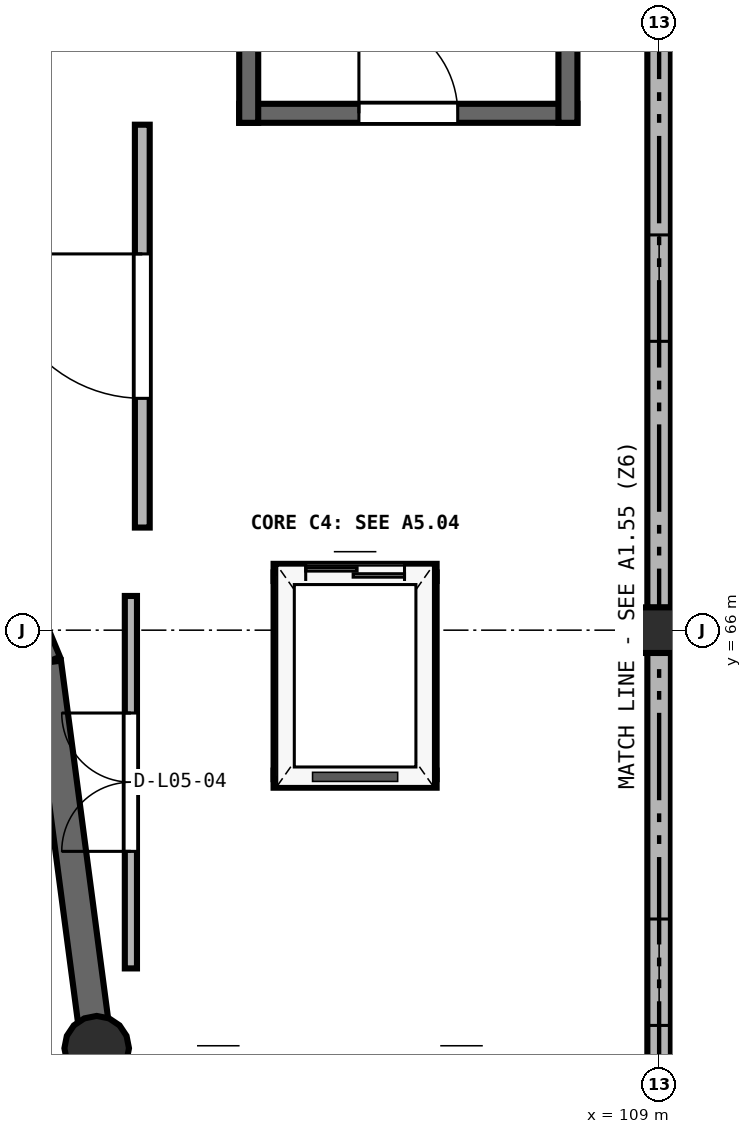
"""IFC4 building model, lengths in metres.
Left out: names, types, materials, properties, quantities, classifications, styles, units other than length and angle.
Written with IfcOpenShell. Run it as: python <this file> out.ifc"""

import sys

from ifc_helpers import new_model, si_unit, direction, frame, frame_2d, origin, origin_2d, place, context, subcontext, project, spatial, rectangle, circle, extrude, element, fill, save


model = new_model("IFC4")
c1 = context("Model", 3, precision=1e-05, world=origin(), true_north=direction((0.0, 1.0)))
c2 = subcontext(c1, "Body", "Model", "MODEL_VIEW")
j1 = project(units=[si_unit("LENGTHUNIT", "METRE"), si_unit("PLANEANGLEUNIT", "RADIAN")], contexts=[c1])
p1 = place(None, origin())
s1 = spatial("IfcSite", under=j1, at=p1, CompositionType="ELEMENT")
p2 = place(p1, origin())
s2 = spatial("IfcBuilding", under=s1, at=p2, CompositionType="ELEMENT")
p3 = place(p2, frame((0.0, 0.0, 23.7)))
s3 = spatial("IfcBuildingStorey", under=s2, at=p3, CompositionType="ELEMENT", Elevation=23.7)
p4 = place(p3, frame((109.0, 66.0, 0.0), z_axis=(0.0, 0.0, 1.0), x_axis=(1.0, 0.0, 0.0)))
e1 = element("IfcColumn", 1, at=p4, inside=s3, PredefinedType="COLUMN", context=c2, shape_type="SweptSolid", body=[
    extrude(rectangle(XDim=0.6, YDim=0.6, at=origin_2d()), origin(), (0.0, 0.0, 1.0), 4.28),
])
p5 = place(p3, frame((101.6, 60.5, 0.0), z_axis=(0.0, 0.0, 1.0), x_axis=(1.0, 0.0, 0.0)))
e2 = element("IfcColumn", 2, at=p5, inside=s3, PredefinedType="COLUMN", context=c2, shape_type="SweptSolid", body=[
    extrude(circle(Radius=0.425, at=origin_2d()), origin(), (0.0, 0.0, 1.0), 2.9),
])
p6 = place(p3, frame((101.6, 60.5, 0.0), z_axis=(0.0, 0.0, 1.0), x_axis=(-0.130591512704, 0.99143625958, 0.0)))
e3 = element("IfcWall", 3, at=p6, inside=s3, PredefinedType="SHEAR", context=c2, shape_type="SweptSolid", body=[
    extrude(rectangle(XDim=5.117, YDim=0.4, at=frame_2d((2.558, 0.0))), origin(), (0.0, 0.0, 1.0), 2.9),
])
p7 = place(p3, frame((100.932, 65.573, 0.0), z_axis=(0.0, 0.0, 1.0), x_axis=(-0.382642581018, 0.923896452635, 0.0)))
e4 = element("IfcWall", 4, at=p7, inside=s3, PredefinedType="SHEAR", context=c2, shape_type="SweptSolid", body=[
    extrude(rectangle(XDim=5.116, YDim=0.4, at=frame_2d((2.558, 0.0))), origin(), (0.0, 0.0, 1.0), 2.9),
])
p8 = place(p3, frame((100.932, 55.427, 0.0), z_axis=(0.0, 0.0, 1.0), x_axis=(0.130591512704, 0.99143625958, 0.0)))
e5 = element("IfcWall", 5, at=p8, inside=s3, PredefinedType="SHEAR", context=c2, shape_type="SweptSolid", body=[
    extrude(rectangle(XDim=5.117, YDim=0.4, at=frame_2d((2.558, 0.0))), origin(), (0.0, 0.0, 1.0), 2.9),
])
p9 = place(p3, frame((109.0, 57.296, 0.0), z_axis=(0.0, 0.0, 1.0), x_axis=(0.0, 1.0, 0.0)))
e6 = element("IfcWall", 6, at=p9, inside=s3, PredefinedType="SOLIDWALL", context=c2, shape_type="SweptSolid", body=[
    extrude(rectangle(XDim=8.408, YDim=0.31, at=frame_2d((4.204, 0.0))), origin(), (0.0, 0.0, 1.0), 3.722),
])
p10 = place(p9, frame((3.504, 0.0, 0.85)))
e7 = element("IfcOpeningElement", 7, at=p10, cuts=e6, PredefinedType="OPENING", context=c2, shape_type="SweptSolid", body=[
    extrude(rectangle(XDim=1.4, YDim=1.65, at=frame_2d((0.7, 0.825))), frame((0.0, 0.165, 0.0), z_axis=(0.0, -1.0, 0.0), x_axis=(1.0, 0.0, 0.0)), (0.0, 0.0, 1.0), 0.33),
])
p11 = place(p3, frame((109.0, 66.296, 0.0), z_axis=(0.0, 0.0, 1.0), x_axis=(0.0, 1.0, 0.0)))
e8 = element("IfcWall", 8, at=p11, inside=s3, PredefinedType="SOLIDWALL", context=c2, shape_type="SweptSolid", body=[
    extrude(rectangle(XDim=8.408, YDim=0.31, at=frame_2d((4.204, 0.0))), origin(), (0.0, 0.0, 1.0), 3.793),
])
p12 = place(p11, frame((3.504, 0.0, 0.85)))
e9 = element("IfcOpeningElement", 9, at=p12, cuts=e8, PredefinedType="OPENING", context=c2, shape_type="SweptSolid", body=[
    extrude(rectangle(XDim=1.4, YDim=1.65, at=frame_2d((0.7, 0.825))), frame((0.0, 0.165, 0.0), z_axis=(0.0, -1.0, 0.0), x_axis=(1.0, 0.0, 0.0)), (0.0, 0.0, 1.0), 0.33),
])
p13 = place(p3, frame((103.475, 72.8, 0.0), z_axis=(0.0, 0.0, 1.0), x_axis=(1.0, 0.0, 0.0)))
e10 = element("IfcWall", 10, at=p13, inside=s3, PredefinedType="SHEAR", context=c2, shape_type="SweptSolid", body=[
    extrude(rectangle(XDim=4.45, YDim=0.25, at=frame_2d((2.225, 0.0))), origin(), (0.0, 0.0, 1.0), 4.28),
])
p14 = place(p13, frame((1.575, 0.0, 0.0)))
e11 = element("IfcOpeningElement", 11, at=p14, cuts=e10, PredefinedType="OPENING", context=c2, shape_type="SweptSolid", body=[
    extrude(rectangle(XDim=1.3, YDim=2.18, at=frame_2d((0.65, 1.09))), frame((0.0, 0.135, 0.0), z_axis=(0.0, -1.0, 0.0), x_axis=(1.0, 0.0, 0.0)), (0.0, 0.0, 1.0), 0.27),
])
for number, where, z_axis, x_axis in (
    (12, (103.6, 72.675, 0.0), (0.0, 0.0, 1.0), (0.0, 1.0, 0.0)),
    (13, (107.8, 72.675, 0.0), (0.0, 0.0, 1.0), (0.0, 1.0, 0.0)),
):
    element("IfcWall", number, at=place(p3, frame(where, z_axis=z_axis, x_axis=x_axis)), inside=s3, PredefinedType="SHEAR", context=c2, shape_type="SweptSolid", body=[
        extrude(rectangle(XDim=11.09, YDim=0.25, at=frame_2d((5.545, 0.0))), origin(), (0.0, 0.0, 1.0), 4.28),
    ])
p15 = place(p3, frame((102.2, 67.35, 0.0), z_axis=(0.0, 0.0, 1.0), x_axis=(0.0, 1.0, 0.0)))
e14 = element("IfcWall", 14, at=p15, inside=s3, PredefinedType="PARTITIONING", context=c2, shape_type="SweptSolid", body=[
    extrude(rectangle(XDim=5.3, YDim=0.195, at=frame_2d((2.65, 0.0))), origin(), (0.0, 0.0, 1.0), 4.23),
])
p16 = place(p15, frame((1.7, 0.0, 0.0)))
e15 = element("IfcOpeningElement", 15, at=p16, cuts=e14, PredefinedType="OPENING", context=c2, shape_type="SweptSolid", body=[
    extrude(rectangle(XDim=1.9, YDim=2.3, at=frame_2d((0.95, 1.15))), frame((0.0, 0.107, 0.0), z_axis=(0.0, -1.0, 0.0), x_axis=(1.0, 0.0, 0.0)), (0.0, 0.0, 1.0), 0.215),
])
p17 = place(p3, frame((103.927, 66.76, 0.0), z_axis=(0.0, 0.0, 1.0), x_axis=(1.0, 0.0, 0.0)))
e16 = element("IfcWall", 16, at=p17, inside=s3, PredefinedType="SOLIDWALL", context=c2, shape_type="SweptSolid", body=[
    extrude(rectangle(XDim=2.145, YDim=0.225, at=frame_2d((1.073, 0.0))), origin(), (0.0, 0.0, 1.0), 4.23),
])
p18 = place(p17, frame((0.423, 0.0, 0.0)))
e17 = element("IfcOpeningElement", 17, at=p18, cuts=e16, PredefinedType="OPENING", context=c2, shape_type="SweptSolid", body=[
    extrude(rectangle(XDim=1.3, YDim=2.25, at=frame_2d((0.65, 1.125))), frame((0.0, 0.123, 0.0), z_axis=(0.0, -1.0, 0.0), x_axis=(1.0, 0.0, 0.0)), (0.0, 0.0, 1.0), 0.245),
])
p19 = place(p3, frame((103.927, 64.04, 0.0), z_axis=(0.0, 0.0, 1.0), x_axis=(1.0, 0.0, 0.0)))
e18 = element("IfcWall", 18, at=p19, inside=s3, PredefinedType="SOLIDWALL", context=c2, shape_type="SweptSolid", body=[
    extrude(rectangle(XDim=2.145, YDim=0.225, at=frame_2d((1.073, 0.0))), origin(), (0.0, 0.0, 1.0), 4.23),
])
for number, where, z_axis, x_axis in (
    (19, (104.04, 64.04, 0.0), (0.0, 0.0, 1.0), (0.0, 1.0, 0.0)),
    (20, (105.96, 64.04, 0.0), (0.0, 0.0, 1.0), (0.0, 1.0, 0.0)),
):
    element("IfcWall", number, at=place(p3, frame(where, z_axis=z_axis, x_axis=x_axis)), inside=s3, PredefinedType="SOLIDWALL", context=c2, shape_type="SweptSolid", body=[
        extrude(rectangle(XDim=2.72, YDim=0.225, at=frame_2d((1.36, 0.0))), origin(), (0.0, 0.0, 1.0), 4.23),
    ])
p20 = place(p3, frame((102.05, 61.55, 0.0), z_axis=(0.0, 0.0, 1.0), x_axis=(0.0, 1.0, 0.0)))
e21 = element("IfcWall", 21, at=p20, inside=s3, PredefinedType="PARTITIONING", context=c2, shape_type="SweptSolid", body=[
    extrude(rectangle(XDim=4.9, YDim=0.16, at=frame_2d((2.45, 0.0))), origin(), (0.0, 0.0, 1.0), 2.87),
])
p21 = place(p20, frame((1.54, 0.0, 0.0)))
e22 = element("IfcOpeningElement", 22, at=p21, cuts=e21, PredefinedType="OPENING", context=c2, shape_type="SweptSolid", body=[
    extrude(rectangle(XDim=1.82, YDim=2.35, at=frame_2d((0.91, 1.175))), frame((0.0, 0.09, 0.0), z_axis=(0.0, -1.0, 0.0), x_axis=(1.0, 0.0, 0.0)), (0.0, 0.0, 1.0), 0.18),
])
p22 = place(p10, origin())
e23 = element("IfcWindow", 23, at=p22, inside=s3, PartitioningType="SINGLE_PANEL", PredefinedType="WINDOW", context=c2, shape_type="SweptSolid", body=[
    extrude(rectangle(XDim=1.4, YDim=1.65, at=frame_2d((0.7, 0.825))), frame((0.0, 0.03, 0.0), z_axis=(0.0, -1.0, 0.0), x_axis=(1.0, 0.0, 0.0)), (0.0, 0.0, 1.0), 0.06),
])
fill(e7, e23)
p23 = place(p12, origin())
e24 = element("IfcWindow", 24, at=p23, inside=s3, PartitioningType="SINGLE_PANEL", PredefinedType="WINDOW", context=c2, shape_type="SweptSolid", body=[
    extrude(rectangle(XDim=1.4, YDim=1.65, at=frame_2d((0.7, 0.825))), frame((0.0, 0.03, 0.0), z_axis=(0.0, -1.0, 0.0), x_axis=(1.0, 0.0, 0.0)), (0.0, 0.0, 1.0), 0.06),
])
fill(e9, e24)
p24 = place(p14, origin())
e25 = element("IfcDoor", 25, at=p24, inside=s3, OperationType="SINGLE_SWING_LEFT", PredefinedType="DOOR", context=c2, shape_type="SweptSolid", body=[
    extrude(rectangle(XDim=1.3, YDim=2.18, at=frame_2d((0.65, 1.09))), frame((0.0, 0.025, 0.0), z_axis=(0.0, -1.0, 0.0), x_axis=(1.0, 0.0, 0.0)), (0.0, 0.0, 1.0), 0.05),
])
fill(e11, e25)
p25 = place(p16, origin())
e26 = element("IfcDoor", 26, at=p25, inside=s3, OperationType="SINGLE_SWING_RIGHT", PredefinedType="DOOR", context=c2, shape_type="SweptSolid", body=[
    extrude(rectangle(XDim=1.9, YDim=2.3, at=frame_2d((0.95, 1.15))), frame((0.0, 0.025, 0.0), z_axis=(0.0, -1.0, 0.0), x_axis=(1.0, 0.0, 0.0)), (0.0, 0.0, 1.0), 0.05),
])
fill(e15, e26)
p26 = place(p18, origin())
e27 = element("IfcDoor", 27, at=p26, inside=s3, OperationType="DOUBLE_DOOR_SLIDING", PredefinedType="DOOR", context=c2, shape_type="SweptSolid", body=[
    extrude(rectangle(XDim=1.3, YDim=2.25, at=frame_2d((0.65, 1.125))), frame((0.0, 0.025, 0.0), z_axis=(0.0, -1.0, 0.0), x_axis=(1.0, 0.0, 0.0)), (0.0, 0.0, 1.0), 0.05),
])
fill(e17, e27)
p27 = place(p21, origin())
e28 = element("IfcDoor", 28, at=p27, inside=s3, OperationType="DOUBLE_DOOR_SINGLE_SWING", PredefinedType="DOOR", context=c2, shape_type="SweptSolid", body=[
    extrude(rectangle(XDim=1.82, YDim=2.35, at=frame_2d((0.91, 1.175))), frame((0.0, 0.025, 0.0), z_axis=(0.0, -1.0, 0.0), x_axis=(1.0, 0.0, 0.0)), (0.0, 0.0, 1.0), 0.05),
])
fill(e22, e28)
save(model, sys.argv[1])
